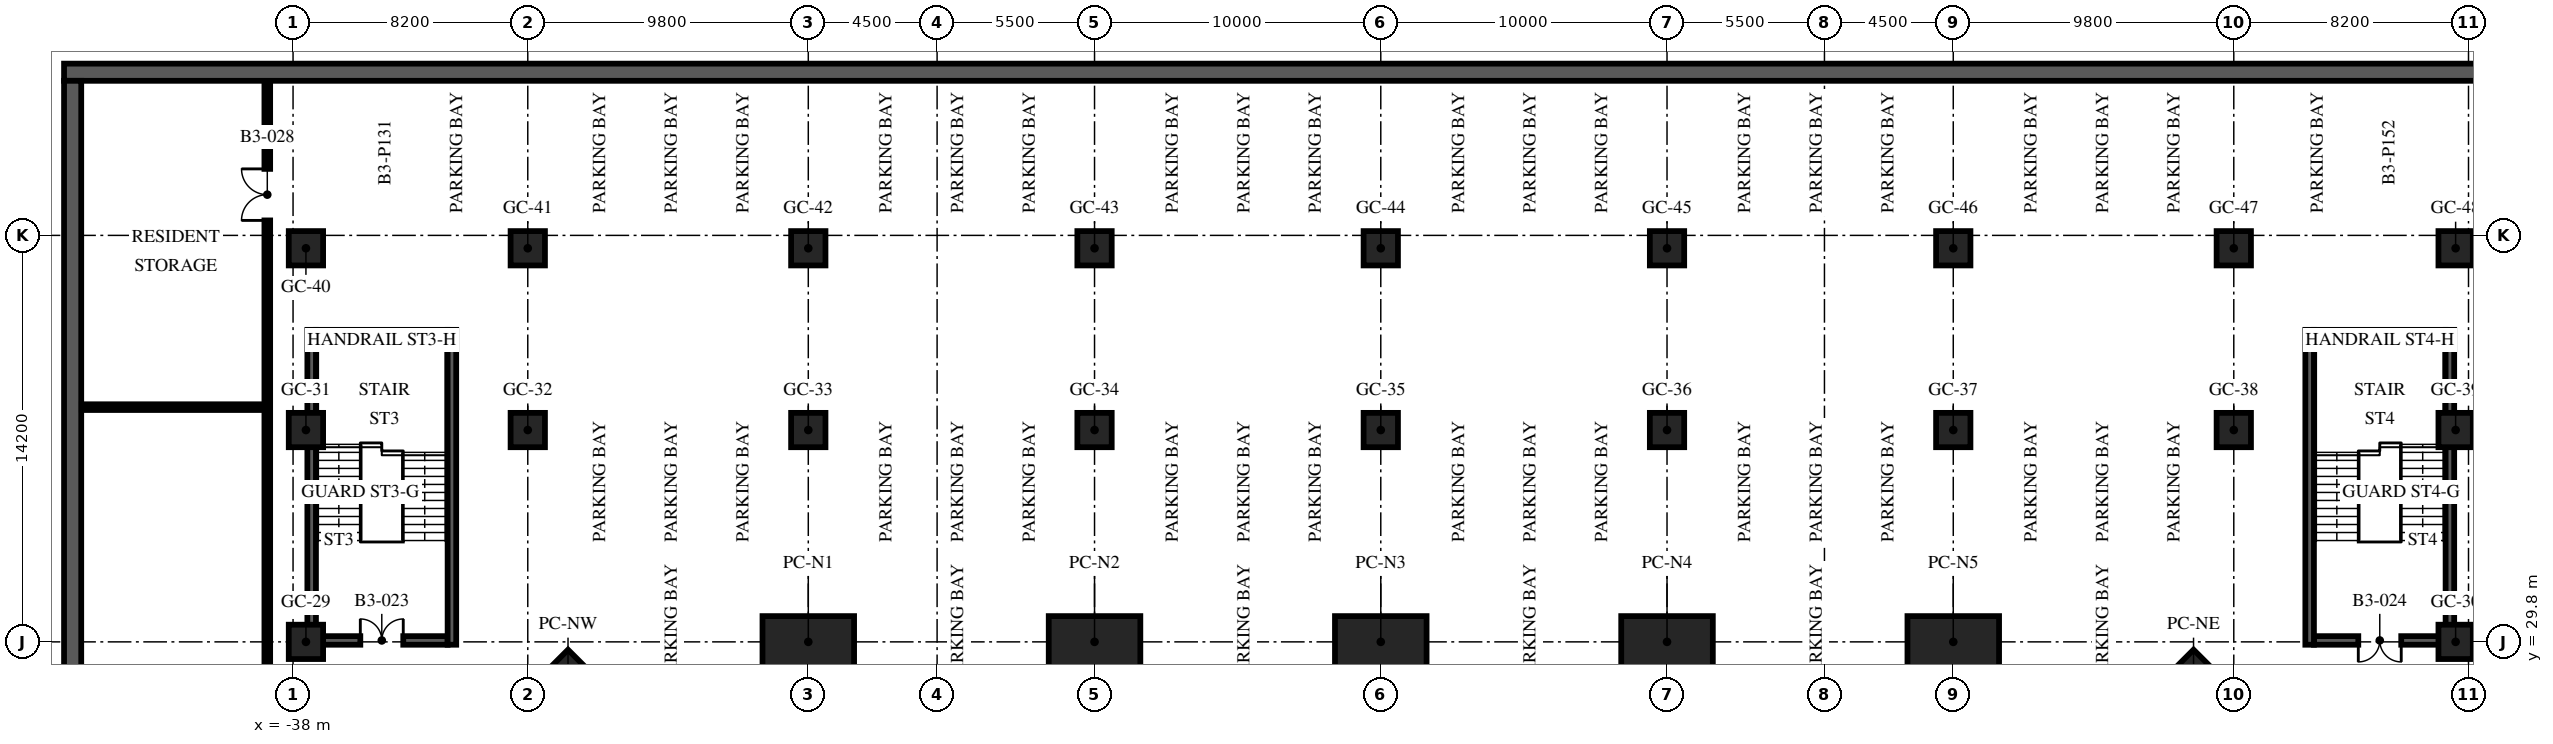
"""IFC4 building model, lengths in metres.
Left out: names, types, materials, properties, quantities, classifications, styles, units other than length and angle.
Written with IfcOpenShell. Run it as: python <this file> out.ifc"""

import sys

from ifc_helpers import new_model, si_unit, direction, frame, frame_2d, origin, origin_2d, place, context, subcontext, project, spatial, rectangle, hollow_rectangle, extrude, element, fill, save


model = new_model("IFC4")
c1 = context("Model", 3, precision=1e-05, world=origin(), true_north=direction((0.0, 1.0)))
c2 = subcontext(c1, "Body", "Model", "MODEL_VIEW")
j1 = project(units=[si_unit("LENGTHUNIT", "METRE"), si_unit("PLANEANGLEUNIT", "RADIAN")], contexts=[c1])
p1 = place(None, origin())
s1 = spatial("IfcSite", under=j1, at=p1, CompositionType="ELEMENT")
p2 = place(p1, origin())
s2 = spatial("IfcBuilding", under=s1, at=p2, CompositionType="ELEMENT")
p3 = place(p2, frame((0.0, 0.0, -13.2)))
s3 = spatial("IfcBuildingStorey", under=s2, at=p3, CompositionType="ELEMENT", Elevation=-13.2)
p4 = place(p3, frame((-46.0, 49.7, -0.4), z_axis=(0.0, 0.0, 1.0), x_axis=(1.0, 0.0, 0.0)))
e1 = element("IfcWall", 1, at=p4, inside=s3, PredefinedType="SOLIDWALL", context=c2, shape_type="SweptSolid", body=[
    extrude(rectangle(XDim=92.0, YDim=0.6, at=frame_2d((46.0, 0.0))), origin(), (0.0, 0.0, 1.0), 4.3),
])
p5 = place(p3, frame((-45.7, -49.4, -0.4), z_axis=(0.0, 0.0, 1.0), x_axis=(0.0, 1.0, 0.0)))
e2 = element("IfcWall", 2, at=p5, inside=s3, PredefinedType="SOLIDWALL", context=c2, shape_type="SweptSolid", body=[
    extrude(rectangle(XDim=98.8, YDim=0.6, at=frame_2d((49.4, 0.0))), origin(), (0.0, 0.0, 1.0), 4.3),
])
for number, where, z_axis, x_axis in (
    (3, (-20.0, 29.8, -0.4), (0.0, 0.0, 1.0), (1.0, 0.0, 0.0)),
    (4, (-10.0, 29.8, -0.4), (0.0, 0.0, 1.0), (1.0, 0.0, 0.0)),
    (5, (0.0, 29.8, -0.4), (0.0, 0.0, 1.0), (1.0, 0.0, 0.0)),
    (6, (10.0, 29.8, -0.4), (0.0, 0.0, 1.0), (1.0, 0.0, 0.0)),
    (7, (20.0, 29.8, -0.4), (0.0, 0.0, 1.0), (1.0, 0.0, 0.0)),
):
    element("IfcColumn", number, at=place(p3, frame(where, z_axis=z_axis, x_axis=x_axis)), inside=s3, PredefinedType="COLUMN", context=c2, shape_type="SweptSolid", body=[
        extrude(hollow_rectangle(XDim=3.2, YDim=1.8, WallThickness=0.2, at=origin_2d()), origin(), (0.0, 0.0, 1.0), 4.6),
    ])
for number, where, z_axis, x_axis in (
    (8, (28.394, 28.394, -0.4), (0.0, 0.0, 1.0), (0.707, -0.707, 0.0)),
    (9, (-28.394, 28.394, -0.4), (0.0, 0.0, 1.0), (0.707, 0.707, 0.0)),
):
    element("IfcColumn", number, at=place(p3, frame(where, z_axis=z_axis, x_axis=x_axis)), inside=s3, PredefinedType="COLUMN", context=c2, shape_type="SweptSolid", body=[
        extrude(hollow_rectangle(XDim=1.6, YDim=1.6, WallThickness=0.1, at=origin_2d()), origin(), (0.0, 0.0, 1.0), 4.6),
    ])
for number, where, z_axis, x_axis in (
    (10, (-37.55, 29.8, -0.4), (0.0, 0.0, 1.0), (1.0, 0.0, 0.0)),
    (11, (37.55, 29.8, -0.4), (0.0, 0.0, 1.0), (1.0, 0.0, 0.0)),
    (12, (-37.55, 37.2, -0.4), (0.0, 0.0, 1.0), (1.0, 0.0, 0.0)),
    (13, (-29.8, 37.2, -0.4), (0.0, 0.0, 1.0), (1.0, 0.0, 0.0)),
    (14, (-20.0, 37.2, -0.4), (0.0, 0.0, 1.0), (1.0, 0.0, 0.0)),
    (15, (-10.0, 37.2, -0.4), (0.0, 0.0, 1.0), (1.0, 0.0, 0.0)),
    (16, (0.0, 37.2, -0.4), (0.0, 0.0, 1.0), (1.0, 0.0, 0.0)),
    (17, (10.0, 37.2, -0.4), (0.0, 0.0, 1.0), (1.0, 0.0, 0.0)),
    (18, (20.0, 37.2, -0.4), (0.0, 0.0, 1.0), (1.0, 0.0, 0.0)),
    (19, (29.8, 37.2, -0.4), (0.0, 0.0, 1.0), (1.0, 0.0, 0.0)),
    (20, (37.55, 37.2, -0.4), (0.0, 0.0, 1.0), (1.0, 0.0, 0.0)),
    (21, (-37.55, 43.55, -0.4), (0.0, 0.0, 1.0), (1.0, 0.0, 0.0)),
    (22, (-29.8, 43.55, -0.4), (0.0, 0.0, 1.0), (1.0, 0.0, 0.0)),
    (23, (-20.0, 43.55, -0.4), (0.0, 0.0, 1.0), (1.0, 0.0, 0.0)),
    (24, (-10.0, 43.55, -0.4), (0.0, 0.0, 1.0), (1.0, 0.0, 0.0)),
    (25, (0.0, 43.55, -0.4), (0.0, 0.0, 1.0), (1.0, 0.0, 0.0)),
    (26, (10.0, 43.55, -0.4), (0.0, 0.0, 1.0), (1.0, 0.0, 0.0)),
    (27, (20.0, 43.55, -0.4), (0.0, 0.0, 1.0), (1.0, 0.0, 0.0)),
    (28, (29.8, 43.55, -0.4), (0.0, 0.0, 1.0), (1.0, 0.0, 0.0)),
    (29, (37.55, 43.55, -0.4), (0.0, 0.0, 1.0), (1.0, 0.0, 0.0)),
):
    element("IfcColumn", number, at=place(p3, frame(where, z_axis=z_axis, x_axis=x_axis)), inside=s3, PredefinedType="COLUMN", context=c2, shape_type="SweptSolid", body=[
        extrude(rectangle(XDim=1.2, YDim=1.2, at=origin_2d()), origin(), (0.0, 0.0, 1.0), 4.6),
    ])
p6 = place(p3, frame((-37.35, 29.7, 0.0), z_axis=(0.0, 0.0, 1.0), x_axis=(0.0, 1.0, 0.0)))
e30 = element("IfcWall", 30, at=p6, inside=s3, PredefinedType="SOLIDWALL", context=c2, shape_type="SweptSolid", body=[
    extrude(rectangle(XDim=11.0, YDim=0.3, at=frame_2d((5.5, 0.0))), origin(), (0.0, 0.0, 1.0), 3.9),
])
p7 = place(p3, frame((-37.2, 29.85, 0.0), z_axis=(0.0, 0.0, 1.0), x_axis=(1.0, 0.0, 0.0)))
e31 = element("IfcWall", 31, at=p7, inside=s3, PredefinedType="SOLIDWALL", context=c2, shape_type="SweptSolid", body=[
    extrude(rectangle(XDim=4.6, YDim=0.3, at=frame_2d((2.3, 0.0))), origin(), (0.0, 0.0, 1.0), 3.9),
])
p8 = place(p7, frame((1.55, 0.0, 0.0)))
e32 = element("IfcOpeningElement", 32, at=p8, cuts=e31, PredefinedType="OPENING", context=c2, shape_type="SweptSolid", body=[
    extrude(rectangle(XDim=1.5, YDim=2.1, at=frame_2d((0.75, 1.05))), frame((0.0, 0.16, 0.0), z_axis=(0.0, -1.0, 0.0), x_axis=(1.0, 0.0, 0.0)), (0.0, 0.0, 1.0), 0.32),
])
p9 = place(p3, frame((-32.45, 29.7, 0.0), z_axis=(0.0, 0.0, 1.0), x_axis=(0.0, 1.0, 0.0)))
e33 = element("IfcWall", 33, at=p9, inside=s3, PredefinedType="SOLIDWALL", context=c2, shape_type="SweptSolid", body=[
    extrude(rectangle(XDim=11.0, YDim=0.3, at=frame_2d((5.5, 0.0))), origin(), (0.0, 0.0, 1.0), 3.9),
])
p10 = place(p3, frame((-37.2, 40.55, 0.0), z_axis=(0.0, 0.0, 1.0), x_axis=(1.0, 0.0, 0.0)))
e34 = element("IfcWall", 34, at=p10, inside=s3, PredefinedType="SOLIDWALL", context=c2, shape_type="SweptSolid", body=[
    extrude(rectangle(XDim=4.6, YDim=0.3, at=frame_2d((2.3, 0.0))), origin(), (0.0, 0.0, 1.0), 3.9),
])
p11 = place(p3, frame((37.35, 29.7, 0.0), z_axis=(0.0, 0.0, 1.0), x_axis=(0.0, 1.0, 0.0)))
e35 = element("IfcWall", 35, at=p11, inside=s3, PredefinedType="SOLIDWALL", context=c2, shape_type="SweptSolid", body=[
    extrude(rectangle(XDim=11.0, YDim=0.3, at=frame_2d((5.5, 0.0))), origin(), (0.0, 0.0, 1.0), 3.9),
])
p12 = place(p3, frame((37.2, 29.85, 0.0), z_axis=(0.0, 0.0, 1.0), x_axis=(-1.0, 0.0, 0.0)))
e36 = element("IfcWall", 36, at=p12, inside=s3, PredefinedType="SOLIDWALL", context=c2, shape_type="SweptSolid", body=[
    extrude(rectangle(XDim=4.6, YDim=0.3, at=frame_2d((2.3, 0.0))), origin(), (0.0, 0.0, 1.0), 3.9),
])
p13 = place(p12, frame((1.55, 0.0, 0.0)))
e37 = element("IfcOpeningElement", 37, at=p13, cuts=e36, PredefinedType="OPENING", context=c2, shape_type="SweptSolid", body=[
    extrude(rectangle(XDim=1.5, YDim=2.1, at=frame_2d((0.75, 1.05))), frame((0.0, 0.16, 0.0), z_axis=(0.0, -1.0, 0.0), x_axis=(1.0, 0.0, 0.0)), (0.0, 0.0, 1.0), 0.32),
])
p14 = place(p3, frame((32.45, 29.7, 0.0), z_axis=(0.0, 0.0, 1.0), x_axis=(0.0, 1.0, 0.0)))
e38 = element("IfcWall", 38, at=p14, inside=s3, PredefinedType="SOLIDWALL", context=c2, shape_type="SweptSolid", body=[
    extrude(rectangle(XDim=11.0, YDim=0.3, at=frame_2d((5.5, 0.0))), origin(), (0.0, 0.0, 1.0), 3.9),
])
p15 = place(p3, frame((37.2, 40.55, 0.0), z_axis=(0.0, 0.0, 1.0), x_axis=(-1.0, 0.0, 0.0)))
e39 = element("IfcWall", 39, at=p15, inside=s3, PredefinedType="SOLIDWALL", context=c2, shape_type="SweptSolid", body=[
    extrude(rectangle(XDim=4.6, YDim=0.3, at=frame_2d((2.3, 0.0))), origin(), (0.0, 0.0, 1.0), 3.9),
])
p16 = place(p3, frame((-38.9, -49.38, 0.0), z_axis=(0.0, 0.0, 1.0), x_axis=(0.0, 1.0, 0.0)))
e40 = element("IfcWall", 40, at=p16, inside=s3, PredefinedType="SOLIDWALL", context=c2, shape_type="SweptSolid", body=[
    extrude(rectangle(XDim=98.76, YDim=0.2, at=frame_2d((49.38, 0.0))), origin(), (0.0, 0.0, 1.0), 2.9),
])
p17 = place(p16, frame((4.77, 0.0, 0.0)))
e41 = element("IfcOpeningElement", 41, at=p17, cuts=e40, PredefinedType="OPENING", context=c2, shape_type="SweptSolid", body=[
    extrude(rectangle(XDim=1.8, YDim=2.4, at=frame_2d((0.9, 1.2))), frame((0.0, 0.11, 0.0), z_axis=(0.0, -1.0, 0.0), x_axis=(1.0, 0.0, 0.0)), (0.0, 0.0, 1.0), 0.22),
])
p18 = place(p16, frame((26.47, 0.0, 0.0)))
e42 = element("IfcOpeningElement", 42, at=p18, cuts=e40, PredefinedType="OPENING", context=c2, shape_type="SweptSolid", body=[
    extrude(rectangle(XDim=1.8, YDim=2.4, at=frame_2d((0.9, 1.2))), frame((0.0, 0.11, 0.0), z_axis=(0.0, -1.0, 0.0), x_axis=(1.0, 0.0, 0.0)), (0.0, 0.0, 1.0), 0.22),
])
p19 = place(p16, frame((71.073, 0.0, 0.0)))
e43 = element("IfcOpeningElement", 43, at=p19, cuts=e40, PredefinedType="OPENING", context=c2, shape_type="SweptSolid", body=[
    extrude(rectangle(XDim=1.8, YDim=2.4, at=frame_2d((0.9, 1.2))), frame((0.0, 0.11, 0.0), z_axis=(0.0, -1.0, 0.0), x_axis=(1.0, 0.0, 0.0)), (0.0, 0.0, 1.0), 0.22),
])
p20 = place(p16, frame((93.903, 0.0, 0.0)))
e44 = element("IfcOpeningElement", 44, at=p20, cuts=e40, PredefinedType="OPENING", context=c2, shape_type="SweptSolid", body=[
    extrude(rectangle(XDim=1.8, YDim=2.4, at=frame_2d((0.9, 1.2))), frame((0.0, 0.11, 0.0), z_axis=(0.0, -1.0, 0.0), x_axis=(1.0, 0.0, 0.0)), (0.0, 0.0, 1.0), 0.22),
])
p21 = place(p3, frame((-45.38, 38.0, 0.0), z_axis=(0.0, 0.0, 1.0), x_axis=(1.0, 0.0, 0.0)))
e45 = element("IfcWall", 45, at=p21, inside=s3, PredefinedType="SOLIDWALL", context=c2, shape_type="SweptSolid", body=[
    extrude(rectangle(XDim=6.38, YDim=0.2, at=frame_2d((3.19, 0.0))), origin(), (0.0, 0.0, 1.0), 3.9),
])
p22 = place(p8, origin())
e46 = element("IfcDoor", 46, at=p22, inside=s3, OperationType="DOUBLE_DOOR_SINGLE_SWING", PredefinedType="DOOR", context=c2, shape_type="SweptSolid", body=[
    extrude(rectangle(XDim=1.5, YDim=2.1, at=frame_2d((0.75, 1.05))), frame((0.0, 0.025, 0.0), z_axis=(0.0, -1.0, 0.0), x_axis=(1.0, 0.0, 0.0)), (0.0, 0.0, 1.0), 0.05),
])
fill(e32, e46)
p23 = place(p13, origin())
e47 = element("IfcDoor", 47, at=p23, inside=s3, OperationType="DOUBLE_DOOR_SINGLE_SWING", PredefinedType="DOOR", context=c2, shape_type="SweptSolid", body=[
    extrude(rectangle(XDim=1.5, YDim=2.1, at=frame_2d((0.75, 1.05))), frame((0.0, 0.025, 0.0), z_axis=(0.0, -1.0, 0.0), x_axis=(1.0, 0.0, 0.0)), (0.0, 0.0, 1.0), 0.05),
])
fill(e37, e47)
p24 = place(p20, origin())
e48 = element("IfcDoor", 48, at=p24, inside=s3, OperationType="DOUBLE_DOOR_SINGLE_SWING", PredefinedType="DOOR", context=c2, shape_type="SweptSolid", body=[
    extrude(rectangle(XDim=1.8, YDim=2.4, at=frame_2d((0.9, 1.2))), frame((0.0, 0.025, 0.0), z_axis=(0.0, -1.0, 0.0), x_axis=(1.0, 0.0, 0.0)), (0.0, 0.0, 1.0), 0.05),
])
fill(e44, e48)
save(model, sys.argv[1])
